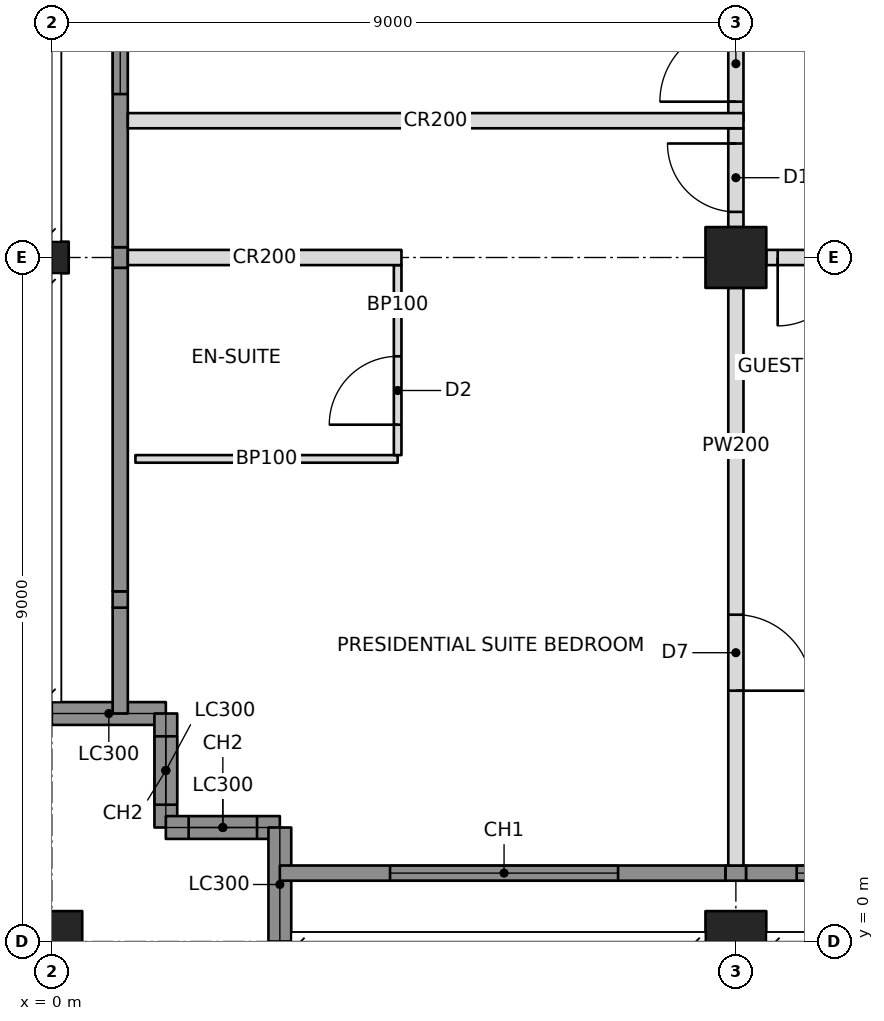
"""IFC4 building model, lengths in metres.
Left out: names, types, materials, properties, quantities, classifications, styles, units other than length and angle.
Written with IfcOpenShell. Run it as: python <this file> out.ifc"""

import sys

from ifc_helpers import new_model, si_unit, direction, frame, frame_2d, origin, origin_with_axes, origin_2d, place, context, subcontext, project, spatial, rectangle, hollow_rectangle, i_section, extrude, element, fill, save


model = new_model("IFC4")
c1 = context("Model", 3, precision=1e-05, world=origin(), true_north=direction((0.0, 1.0)))
c2 = subcontext(c1, "Body", "Model", "MODEL_VIEW")
j1 = project(units=[si_unit("LENGTHUNIT", "METRE"), si_unit("PLANEANGLEUNIT", "RADIAN")], contexts=[c1])
p1 = place(None, origin())
s1 = spatial("IfcSite", under=j1, at=p1, CompositionType="ELEMENT")
p2 = place(p1, origin())
s2 = spatial("IfcBuilding", under=s1, at=p2, CompositionType="ELEMENT")
p3 = place(p2, frame((0.0, 0.0, 262.6)))
s3 = spatial("IfcBuildingStorey", under=s2, at=p3, CompositionType="ELEMENT", Elevation=262.6)
p4 = place(p3, origin_with_axes())
e1 = element("IfcColumn", 1, at=p4, inside=s3, PredefinedType="COLUMN", context=c2, shape_type="SweptSolid", body=[
    extrude(hollow_rectangle(XDim=0.8, YDim=0.8, WallThickness=0.032, at=origin_2d()), origin(), (0.0, 0.0, 1.0), 3.6),
])
p5 = place(p3, frame((0.0, 9.0, 0.0), z_axis=(0.0, 0.0, 1.0), x_axis=(0.0, 1.0, 0.0)))
e2 = element("IfcColumn", 2, at=p5, inside=s3, PredefinedType="COLUMN", context=c2, shape_type="SweptSolid", body=[
    extrude(i_section(OverallWidth=0.417, OverallDepth=0.445, WebThickness=0.039, FlangeThickness=0.063, at=origin_2d()), origin(), (0.0, 0.0, 1.0), 3.6),
])
for number, where, z_axis, x_axis in (
    (3, (9.0, 0.0, 0.0), (0.0, 0.0, 1.0), (1.0, 0.0, 0.0)),
    (4, (9.0, 9.0, 0.0), (0.0, 0.0, 1.0), (1.0, 0.0, 0.0)),
):
    element("IfcColumn", number, at=place(p3, frame(where, z_axis=z_axis, x_axis=x_axis)), inside=s3, PredefinedType="COLUMN", context=c2, shape_type="SweptSolid", body=[
        extrude(hollow_rectangle(XDim=0.8, YDim=0.8, WallThickness=0.032, at=origin_2d()), origin(), (0.0, 0.0, 1.0), 3.6),
    ])
p6 = place(p3, frame((0.0, 3.0, 0.0), z_axis=(0.0, 0.0, 1.0), x_axis=(1.0, 0.0, 0.0)))
e5 = element("IfcWall", 5, at=p6, inside=s3, PredefinedType="SOLIDWALL", context=c2, shape_type="SweptSolid", body=[
    extrude(rectangle(XDim=1.5, YDim=0.3, at=frame_2d((0.75, 0.0))), origin(), (0.0, 0.0, 1.0), 2.62),
])
p7 = place(p3, frame((1.5, 3.0, 0.0), z_axis=(0.0, 0.0, 1.0), x_axis=(0.0, -1.0, 0.0)))
e6 = element("IfcWall", 6, at=p7, inside=s3, PredefinedType="SOLIDWALL", context=c2, shape_type="SweptSolid", body=[
    extrude(rectangle(XDim=1.5, YDim=0.3, at=frame_2d((0.75, 0.0))), origin(), (0.0, 0.0, 1.0), 3.4),
])
p8 = place(p7, frame((0.3, 0.0, 0.6)))
e7 = element("IfcOpeningElement", 7, at=p8, cuts=e6, PredefinedType="OPENING", context=c2, shape_type="SweptSolid", body=[
    extrude(rectangle(XDim=0.9, YDim=2.2, at=frame_2d((0.45, 1.1))), frame((0.0, 0.16, 0.0), z_axis=(0.0, -1.0, 0.0), x_axis=(1.0, 0.0, 0.0)), (0.0, 0.0, 1.0), 0.32),
])
p9 = place(p3, frame((1.5, 1.5, 0.0), z_axis=(0.0, 0.0, 1.0), x_axis=(1.0, 0.0, 0.0)))
e8 = element("IfcWall", 8, at=p9, inside=s3, PredefinedType="SOLIDWALL", context=c2, shape_type="SweptSolid", body=[
    extrude(rectangle(XDim=1.5, YDim=0.3, at=frame_2d((0.75, 0.0))), origin(), (0.0, 0.0, 1.0), 3.4),
])
p10 = place(p9, frame((0.3, 0.0, 0.6)))
e9 = element("IfcOpeningElement", 9, at=p10, cuts=e8, PredefinedType="OPENING", context=c2, shape_type="SweptSolid", body=[
    extrude(rectangle(XDim=0.9, YDim=2.2, at=frame_2d((0.45, 1.1))), frame((0.0, 0.16, 0.0), z_axis=(0.0, -1.0, 0.0), x_axis=(1.0, 0.0, 0.0)), (0.0, 0.0, 1.0), 0.32),
])
p11 = place(p3, frame((3.0, 1.5, 0.0), z_axis=(0.0, 0.0, 1.0), x_axis=(0.0, -1.0, 0.0)))
e10 = element("IfcWall", 10, at=p11, inside=s3, PredefinedType="SOLIDWALL", context=c2, shape_type="SweptSolid", body=[
    extrude(rectangle(XDim=1.5, YDim=0.3, at=frame_2d((0.75, 0.0))), origin(), (0.0, 0.0, 1.0), 2.62),
])
p12 = place(p3, frame((3.0, 0.9, 0.0), z_axis=(0.0, 0.0, 1.0), x_axis=(1.0, 0.0, 0.0)))
e11 = element("IfcWall", 11, at=p12, inside=s3, PredefinedType="SOLIDWALL", context=c2, shape_type="SweptSolid", body=[
    extrude(rectangle(XDim=5.865, YDim=0.2, at=frame_2d((2.932, 0.0))), origin(), (0.0, 0.0, 1.0), 3.4),
])
p13 = place(p12, frame((1.45, 0.0, 0.6)))
e12 = element("IfcOpeningElement", 12, at=p13, cuts=e11, PredefinedType="OPENING", context=c2, shape_type="SweptSolid", body=[
    extrude(rectangle(XDim=3.0, YDim=2.2, at=frame_2d((1.5, 1.1))), frame((0.0, 0.11, 0.0), z_axis=(0.0, -1.0, 0.0), x_axis=(1.0, 0.0, 0.0)), (0.0, 0.0, 1.0), 0.22),
])
p14 = place(p3, frame((0.9, 3.0, 0.0), z_axis=(0.0, 0.0, 1.0), x_axis=(0.0, 1.0, 0.0)))
e13 = element("IfcWall", 13, at=p14, inside=s3, PredefinedType="SOLIDWALL", context=c2, shape_type="SweptSolid", body=[
    extrude(rectangle(XDim=1.393, YDim=0.2, at=frame_2d((0.696, 0.0))), origin(), (0.0, 0.0, 1.0), 3.4),
])
p15 = place(p3, frame((1.0, 9.0, 0.0), z_axis=(0.0, 0.0, 1.0), x_axis=(1.0, 0.0, 0.0)))
e14 = element("IfcWall", 14, at=p15, inside=s3, PredefinedType="PARTITIONING", context=c2, shape_type="SweptSolid", body=[
    extrude(rectangle(XDim=3.6, YDim=0.2, at=frame_2d((1.8, 0.0))), origin(), (0.0, 0.0, 1.0), 2.638),
])
p16 = place(p3, frame((9.4, 9.0, 0.0), z_axis=(0.0, 0.0, 1.0), x_axis=(1.0, 0.0, 0.0)))
e15 = element("IfcWall", 15, at=p16, inside=s3, PredefinedType="PARTITIONING", context=c2, shape_type="SweptSolid", body=[
    extrude(rectangle(XDim=8.2, YDim=0.2, at=frame_2d((4.1, 0.0))), origin(), (0.0, 0.0, 1.0), 2.605),
])
p17 = place(p16, frame((0.15, 0.0, 0.0)))
e16 = element("IfcOpeningElement", 16, at=p17, cuts=e15, PredefinedType="OPENING", context=c2, shape_type="SweptSolid", body=[
    extrude(rectangle(XDim=0.9, YDim=2.1, at=frame_2d((0.45, 1.05))), frame((0.0, 0.11, 0.0), z_axis=(0.0, -1.0, 0.0), x_axis=(1.0, 0.0, 0.0)), (0.0, 0.0, 1.0), 0.22),
])
p18 = place(p3, frame((9.0, 10.8, 0.0), z_axis=(0.0, 0.0, 1.0), x_axis=(0.0, 1.0, 0.0)))
e17 = element("IfcWall", 17, at=p18, inside=s3, PredefinedType="PARTITIONING", context=c2, shape_type="SweptSolid", body=[
    extrude(rectangle(XDim=6.8, YDim=0.2, at=frame_2d((3.4, 0.0))), origin(), (0.0, 0.0, 1.0), 2.605),
])
p19 = place(p18, frame((0.25, 0.0, 0.0)))
e18 = element("IfcOpeningElement", 18, at=p19, cuts=e17, PredefinedType="OPENING", context=c2, shape_type="SweptSolid", body=[
    extrude(rectangle(XDim=1.0, YDim=2.1, at=frame_2d((0.5, 1.05))), frame((0.0, 0.11, 0.0), z_axis=(0.0, -1.0, 0.0), x_axis=(1.0, 0.0, 0.0)), (0.0, 0.0, 1.0), 0.22),
])
p20 = place(p3, frame((1.0, 10.8, 0.0), z_axis=(0.0, 0.0, 1.0), x_axis=(1.0, 0.0, 0.0)))
e19 = element("IfcWall", 19, at=p20, inside=s3, PredefinedType="PARTITIONING", context=c2, shape_type="SweptSolid", body=[
    extrude(rectangle(XDim=8.1, YDim=0.2, at=frame_2d((4.05, 0.0))), origin(), (0.0, 0.0, 1.0), 2.604),
])
p21 = place(p3, frame((9.0, 8.6, 0.0), z_axis=(0.0, 0.0, 1.0), x_axis=(0.0, -1.0, 0.0)))
e20 = element("IfcWall", 20, at=p21, inside=s3, PredefinedType="PARTITIONING", context=c2, shape_type="SweptSolid", body=[
    extrude(rectangle(XDim=7.6, YDim=0.2, at=frame_2d((3.8, 0.0))), origin(), (0.0, 0.0, 1.0), 2.638),
])
p22 = place(p21, frame((4.3, 0.0, 0.0)))
e21 = element("IfcOpeningElement", 21, at=p22, cuts=e20, PredefinedType="OPENING", context=c2, shape_type="SweptSolid", body=[
    extrude(rectangle(XDim=1.0, YDim=2.1, at=frame_2d((0.5, 1.05))), frame((0.0, 0.11, 0.0), z_axis=(0.0, -1.0, 0.0), x_axis=(1.0, 0.0, 0.0)), (0.0, 0.0, 1.0), 0.22),
])
p23 = place(p3, frame((1.1, 6.35, 0.0), z_axis=(0.0, 0.0, 1.0), x_axis=(1.0, 0.0, 0.0)))
e22 = element("IfcWall", 22, at=p23, inside=s3, PredefinedType="PARTITIONING", context=c2, shape_type="SweptSolid", body=[
    extrude(rectangle(XDim=3.45, YDim=0.1, at=frame_2d((1.725, 0.0))), origin(), (0.0, 0.0, 1.0), 3.4),
])
p24 = place(p3, frame((4.55, 8.9, 0.0), z_axis=(0.0, 0.0, 1.0), x_axis=(0.0, -1.0, 0.0)))
e23 = element("IfcWall", 23, at=p24, inside=s3, PredefinedType="PARTITIONING", context=c2, shape_type="SweptSolid", body=[
    extrude(rectangle(XDim=2.5, YDim=0.1, at=frame_2d((1.25, 0.0))), origin(), (0.0, 0.0, 1.0), 2.638),
])
p25 = place(p24, frame((1.2, 0.0, 0.0)))
e24 = element("IfcOpeningElement", 24, at=p25, cuts=e23, PredefinedType="OPENING", context=c2, shape_type="SweptSolid", body=[
    extrude(rectangle(XDim=0.9, YDim=2.1, at=frame_2d((0.45, 1.05))), frame((0.0, 0.06, 0.0), z_axis=(0.0, -1.0, 0.0), x_axis=(1.0, 0.0, 0.0)), (0.0, 0.0, 1.0), 0.12),
])
p26 = place(p3, frame((9.0, 9.4, 0.0), z_axis=(0.0, 0.0, 1.0), x_axis=(0.0, 1.0, 0.0)))
e25 = element("IfcWall", 25, at=p26, inside=s3, PredefinedType="PARTITIONING", context=c2, shape_type="SweptSolid", body=[
    extrude(rectangle(XDim=1.3, YDim=0.2, at=frame_2d((0.65, 0.0))), origin(), (0.0, 0.0, 1.0), 2.605),
])
p27 = place(p26, frame((0.2, 0.0, 0.0)))
e26 = element("IfcOpeningElement", 26, at=p27, cuts=e25, PredefinedType="OPENING", context=c2, shape_type="SweptSolid", body=[
    extrude(rectangle(XDim=0.9, YDim=2.1, at=frame_2d((0.45, 1.05))), frame((0.0, 0.11, 0.0), z_axis=(0.0, -1.0, 0.0), x_axis=(1.0, 0.0, 0.0)), (0.0, 0.0, 1.0), 0.22),
])
p28 = place(p3, frame((8.865, 0.9, 0.0), z_axis=(0.0, 0.0, 1.0), x_axis=(1.0, 0.0, 0.0)))
e27 = element("IfcWall", 27, at=p28, inside=s3, PredefinedType="SOLIDWALL", context=c2, shape_type="SweptSolid", body=[
    extrude(rectangle(XDim=0.271, YDim=0.2, at=frame_2d((0.135, 0.0))), origin(), (0.0, 0.0, 1.0), 2.638),
])
p29 = place(p3, frame((9.135, 0.9, 0.0), z_axis=(0.0, 0.0, 1.0), x_axis=(1.0, 0.0, 0.0)))
e28 = element("IfcWall", 28, at=p29, inside=s3, PredefinedType="SOLIDWALL", context=c2, shape_type="SweptSolid", body=[
    extrude(rectangle(XDim=8.671, YDim=0.2, at=frame_2d((4.335, 0.0))), origin(), (0.0, 0.0, 1.0), 3.4),
])
p30 = place(p29, frame((0.665, 0.0, 0.6)))
e29 = element("IfcOpeningElement", 29, at=p30, cuts=e28, PredefinedType="OPENING", context=c2, shape_type="SweptSolid", body=[
    extrude(rectangle(XDim=3.0, YDim=2.2, at=frame_2d((1.5, 1.1))), frame((0.0, 0.11, 0.0), z_axis=(0.0, -1.0, 0.0), x_axis=(1.0, 0.0, 0.0)), (0.0, 0.0, 1.0), 0.22),
])
p31 = place(p29, frame((5.065, 0.0, 0.6)))
e30 = element("IfcOpeningElement", 30, at=p31, cuts=e28, PredefinedType="OPENING", context=c2, shape_type="SweptSolid", body=[
    extrude(rectangle(XDim=3.0, YDim=2.2, at=frame_2d((1.5, 1.1))), frame((0.0, 0.11, 0.0), z_axis=(0.0, -1.0, 0.0), x_axis=(1.0, 0.0, 0.0)), (0.0, 0.0, 1.0), 0.22),
])
p32 = place(p3, frame((0.9, 4.393, 0.0), z_axis=(0.0, 0.0, 1.0), x_axis=(0.0, 1.0, 0.0)))
e31 = element("IfcWall", 31, at=p32, inside=s3, PredefinedType="SOLIDWALL", context=c2, shape_type="SweptSolid", body=[
    extrude(rectangle(XDim=0.215, YDim=0.2, at=frame_2d((0.107, 0.0))), origin(), (0.0, 0.0, 1.0), 2.861),
])
p33 = place(p3, frame((0.9, 4.607, 0.0), z_axis=(0.0, 0.0, 1.0), x_axis=(0.0, 1.0, 0.0)))
e32 = element("IfcWall", 32, at=p33, inside=s3, PredefinedType="SOLIDWALL", context=c2, shape_type="SweptSolid", body=[
    extrude(rectangle(XDim=4.257, YDim=0.2, at=frame_2d((2.129, 0.0))), origin(), (0.0, 0.0, 1.0), 3.4),
])
p34 = place(p3, frame((0.9, 8.865, 0.0), z_axis=(0.0, 0.0, 1.0), x_axis=(0.0, 1.0, 0.0)))
e33 = element("IfcWall", 33, at=p34, inside=s3, PredefinedType="SOLIDWALL", context=c2, shape_type="SweptSolid", body=[
    extrude(rectangle(XDim=0.271, YDim=0.2, at=frame_2d((0.135, 0.0))), origin(), (0.0, 0.0, 1.0), 2.638),
])
p35 = place(p3, frame((0.9, 9.135, 0.0), z_axis=(0.0, 0.0, 1.0), x_axis=(0.0, 1.0, 0.0)))
e34 = element("IfcWall", 34, at=p35, inside=s3, PredefinedType="SOLIDWALL", context=c2, shape_type="SweptSolid", body=[
    extrude(rectangle(XDim=8.671, YDim=0.2, at=frame_2d((4.335, 0.0))), origin(), (0.0, 0.0, 1.0), 3.4),
])
p36 = place(p35, frame((2.015, 0.0, 0.6)))
e35 = element("IfcOpeningElement", 35, at=p36, cuts=e34, PredefinedType="OPENING", context=c2, shape_type="SweptSolid", body=[
    extrude(rectangle(XDim=3.0, YDim=2.2, at=frame_2d((1.5, 1.1))), frame((0.0, 0.11, 0.0), z_axis=(0.0, -1.0, 0.0), x_axis=(1.0, 0.0, 0.0)), (0.0, 0.0, 1.0), 0.22),
])
p37 = place(p35, frame((5.515, 0.0, 0.6)))
e36 = element("IfcOpeningElement", 36, at=p37, cuts=e34, PredefinedType="OPENING", context=c2, shape_type="SweptSolid", body=[
    extrude(rectangle(XDim=3.0, YDim=2.2, at=frame_2d((1.5, 1.1))), frame((0.0, 0.11, 0.0), z_axis=(0.0, -1.0, 0.0), x_axis=(1.0, 0.0, 0.0)), (0.0, 0.0, 1.0), 0.22),
])
p38 = place(p8, origin())
e37 = element("IfcWindow", 37, at=p38, inside=s3, PartitioningType="SINGLE_PANEL", PredefinedType="WINDOW", context=c2, shape_type="SweptSolid", body=[
    extrude(rectangle(XDim=0.9, YDim=2.2, at=frame_2d((0.45, 1.1))), frame((0.0, 0.03, 0.0), z_axis=(0.0, -1.0, 0.0), x_axis=(1.0, 0.0, 0.0)), (0.0, 0.0, 1.0), 0.06),
])
fill(e7, e37)
p39 = place(p10, origin())
e38 = element("IfcWindow", 38, at=p39, inside=s3, PartitioningType="SINGLE_PANEL", PredefinedType="WINDOW", context=c2, shape_type="SweptSolid", body=[
    extrude(rectangle(XDim=0.9, YDim=2.2, at=frame_2d((0.45, 1.1))), frame((0.0, 0.03, 0.0), z_axis=(0.0, -1.0, 0.0), x_axis=(1.0, 0.0, 0.0)), (0.0, 0.0, 1.0), 0.06),
])
fill(e9, e38)
p40 = place(p13, origin())
e39 = element("IfcWindow", 39, at=p40, inside=s3, PartitioningType="TRIPLE_PANEL_VERTICAL", PredefinedType="WINDOW", context=c2, shape_type="SweptSolid", body=[
    extrude(rectangle(XDim=3.0, YDim=2.2, at=frame_2d((1.5, 1.1))), frame((0.0, 0.03, 0.0), z_axis=(0.0, -1.0, 0.0), x_axis=(1.0, 0.0, 0.0)), (0.0, 0.0, 1.0), 0.06),
])
fill(e12, e39)
p41 = place(p30, origin())
e40 = element("IfcWindow", 40, at=p41, inside=s3, PartitioningType="TRIPLE_PANEL_VERTICAL", PredefinedType="WINDOW", context=c2, shape_type="SweptSolid", body=[
    extrude(rectangle(XDim=3.0, YDim=2.2, at=frame_2d((1.5, 1.1))), frame((0.0, 0.03, 0.0), z_axis=(0.0, -1.0, 0.0), x_axis=(1.0, 0.0, 0.0)), (0.0, 0.0, 1.0), 0.06),
])
fill(e29, e40)
p42 = place(p36, origin())
e41 = element("IfcWindow", 41, at=p42, inside=s3, PartitioningType="TRIPLE_PANEL_VERTICAL", PredefinedType="WINDOW", context=c2, shape_type="SweptSolid", body=[
    extrude(rectangle(XDim=3.0, YDim=2.2, at=frame_2d((1.5, 1.1))), frame((0.0, 0.03, 0.0), z_axis=(0.0, -1.0, 0.0), x_axis=(1.0, 0.0, 0.0)), (0.0, 0.0, 1.0), 0.06),
])
fill(e35, e41)
p43 = place(p22, origin())
e42 = element("IfcDoor", 42, at=p43, inside=s3, OperationType="SINGLE_SWING_RIGHT", PredefinedType="DOOR", context=c2, shape_type="SweptSolid", body=[
    extrude(rectangle(XDim=1.0, YDim=2.1, at=frame_2d((0.5, 1.05))), frame((0.0, 0.025, 0.0), z_axis=(0.0, -1.0, 0.0), x_axis=(1.0, 0.0, 0.0)), (0.0, 0.0, 1.0), 0.05),
])
fill(e21, e42)
p44 = place(p25, frame((0.9, 0.0, 0.0), z_axis=(0.0, 0.0, 1.0), x_axis=(-1.0, 0.0, 0.0)))
e43 = element("IfcDoor", 43, at=p44, inside=s3, OperationType="SINGLE_SWING_LEFT", PredefinedType="DOOR", context=c2, shape_type="SweptSolid", body=[
    extrude(rectangle(XDim=0.9, YDim=2.1, at=frame_2d((0.45, 1.05))), frame((0.0, 0.025, 0.0), z_axis=(0.0, -1.0, 0.0), x_axis=(1.0, 0.0, 0.0)), (0.0, 0.0, 1.0), 0.05),
])
fill(e24, e43)
p45 = place(p17, frame((0.9, 0.0, 0.0), z_axis=(0.0, 0.0, 1.0), x_axis=(-1.0, 0.0, 0.0)))
e44 = element("IfcDoor", 44, at=p45, inside=s3, OperationType="SINGLE_SWING_RIGHT", PredefinedType="DOOR", context=c2, shape_type="SweptSolid", body=[
    extrude(rectangle(XDim=0.9, YDim=2.1, at=frame_2d((0.45, 1.05))), frame((0.0, 0.025, 0.0), z_axis=(0.0, -1.0, 0.0), x_axis=(1.0, 0.0, 0.0)), (0.0, 0.0, 1.0), 0.05),
])
fill(e16, e44)
p46 = place(p19, origin())
e45 = element("IfcDoor", 45, at=p46, inside=s3, OperationType="SINGLE_SWING_LEFT", PredefinedType="DOOR", context=c2, shape_type="SweptSolid", body=[
    extrude(rectangle(XDim=1.0, YDim=2.1, at=frame_2d((0.5, 1.05))), frame((0.0, 0.025, 0.0), z_axis=(0.0, -1.0, 0.0), x_axis=(1.0, 0.0, 0.0)), (0.0, 0.0, 1.0), 0.05),
])
fill(e18, e45)
p47 = place(p27, origin())
e46 = element("IfcDoor", 46, at=p47, inside=s3, OperationType="SINGLE_SWING_RIGHT", PredefinedType="DOOR", context=c2, shape_type="SweptSolid", body=[
    extrude(rectangle(XDim=0.9, YDim=2.1, at=frame_2d((0.45, 1.05))), frame((0.0, 0.025, 0.0), z_axis=(0.0, -1.0, 0.0), x_axis=(1.0, 0.0, 0.0)), (0.0, 0.0, 1.0), 0.05),
])
fill(e26, e46)
save(model, sys.argv[1])
